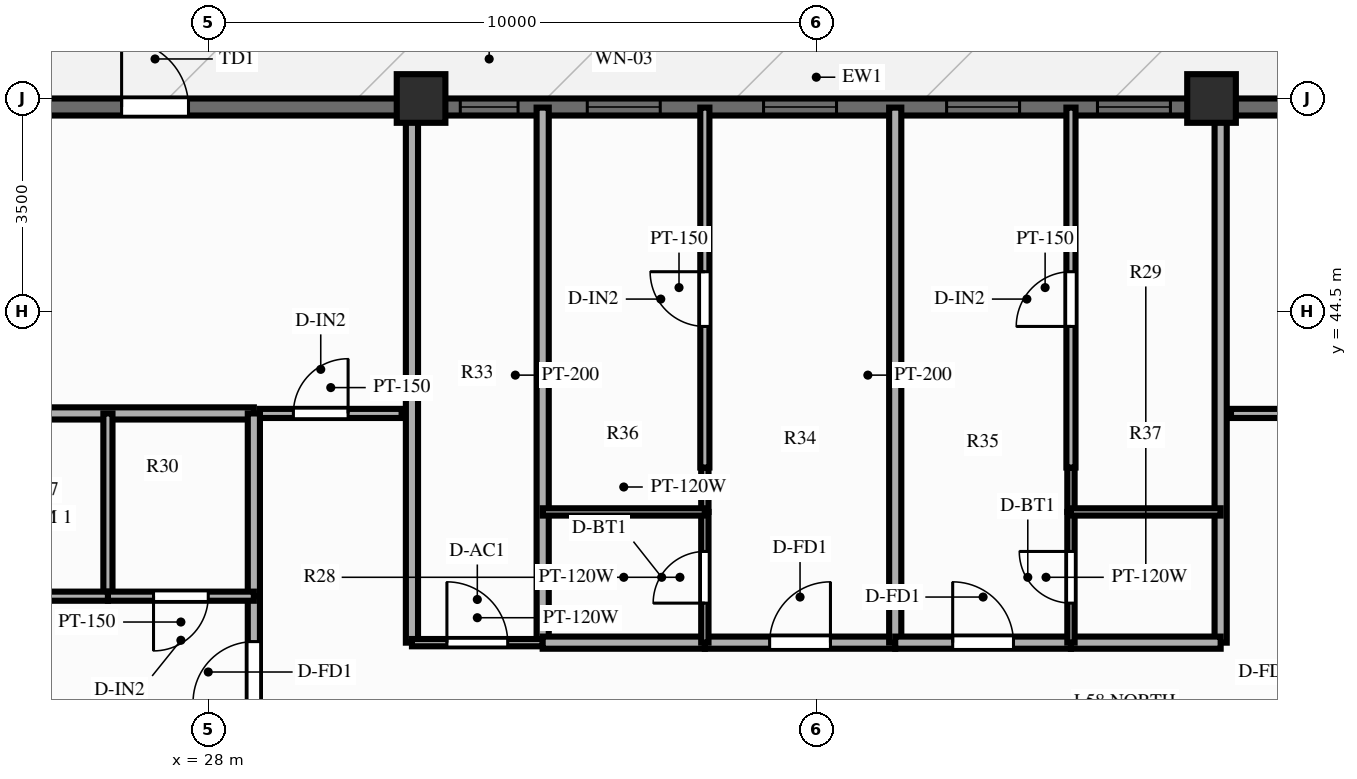
"""IFC4 building model, lengths in metres.
Left out: names, types, materials, properties, quantities, classifications, styles, units other than length and angle.
Written with IfcOpenShell. Run it as: python <this file> out.ifc"""

import sys

from ifc_helpers import new_model, si_unit, direction, frame, frame_2d, origin, origin_2d, place, context, subcontext, project, spatial, rectangle, extrude, source, transform, mapped, element, fill, save


model = new_model("IFC4")
c1 = context("Model", 3, precision=1e-05, world=origin(), true_north=direction((0.0, 1.0)))
c2 = subcontext(c1, "Body", "Model", "MODEL_VIEW")
j1 = project(units=[si_unit("LENGTHUNIT", "METRE"), si_unit("PLANEANGLEUNIT", "RADIAN")], contexts=[c1])
p1 = place(None, origin())
s1 = spatial("IfcSite", under=j1, at=p1, CompositionType="ELEMENT")
p2 = place(p1, origin())
s2 = spatial("IfcBuilding", under=s1, at=p2, CompositionType="ELEMENT")
p3 = place(p2, frame((0.0, 0.0, 186.7)))
s3 = spatial("IfcBuildingStorey", under=s2, at=p3, CompositionType="ELEMENT", Elevation=186.7)
m1 = source(origin(), c2, "Body", "SweptSolid", [
    extrude(rectangle(XDim=0.8, YDim=0.8, at=origin_2d()), origin(), (0.0, 0.0, 1.0), 3.0),
])
for number, where, z_axis, x_axis in (
    (1, (44.5, 48.0, 0.0), (0.0, 0.0, 1.0), (1.0, 0.0, 0.0)),
    (2, (31.5, 48.0, 0.0), (0.0, 0.0, 1.0), (1.0, 0.0, 0.0)),
):
    element("IfcColumn", number, at=place(p3, frame(where, z_axis=z_axis, x_axis=x_axis)), inside=s3, PredefinedType="COLUMN", context=c2, shape_type="MappedRepresentation", body=[
        mapped(m1, transform((0.0, 0.0, 0.0), scale=1.0)),
    ])
p4 = place(p3, frame((22.75, 47.86, 0.0), z_axis=(0.0, 0.0, 1.0), x_axis=(1.0, 0.0, 0.0)))
e3 = element("IfcWall", 3, at=p4, inside=s3, PredefinedType="SOLIDWALL", context=c2, shape_type="SweptSolid", body=[
    extrude(rectangle(XDim=30.5, YDim=0.28, at=frame_2d((15.25, 0.0))), origin(), (0.0, 0.0, 1.0), 2.28),
])
p5 = place(p4, frame((3.825, 0.0, 0.0)))
e4 = element("IfcOpeningElement", 4, at=p5, cuts=e3, PredefinedType="OPENING", context=c2, shape_type="SweptSolid", body=[
    extrude(rectangle(XDim=1.1, YDim=2.15, at=frame_2d((0.55, 1.075))), frame((0.0, 0.152, 0.0), z_axis=(0.0, -1.0, 0.0), x_axis=(1.0, 0.0, 0.0)), (0.0, 0.0, 1.0), 0.304),
])
p6 = place(p4, frame((9.395, 0.0, 0.25)))
e5 = element("IfcOpeningElement", 5, at=p6, cuts=e3, PredefinedType="OPENING", context=c2, shape_type="SweptSolid", body=[
    extrude(rectangle(XDim=0.95, YDim=1.5, at=frame_2d((0.475, 0.75))), frame((0.0, 0.152, 0.0), z_axis=(0.0, -1.0, 0.0), x_axis=(1.0, 0.0, 0.0)), (0.0, 0.0, 1.0), 0.304),
])
p7 = place(p4, frame((11.483, 0.0, 0.25)))
e6 = element("IfcOpeningElement", 6, at=p7, cuts=e3, PredefinedType="OPENING", context=c2, shape_type="SweptSolid", body=[
    extrude(rectangle(XDim=1.2, YDim=1.5, at=frame_2d((0.6, 0.75))), frame((0.0, 0.152, 0.0), z_axis=(0.0, -1.0, 0.0), x_axis=(1.0, 0.0, 0.0)), (0.0, 0.0, 1.0), 0.304),
])
p8 = place(p4, frame((14.383, 0.0, 0.25)))
e7 = element("IfcOpeningElement", 7, at=p8, cuts=e3, PredefinedType="OPENING", context=c2, shape_type="SweptSolid", body=[
    extrude(rectangle(XDim=1.2, YDim=1.5, at=frame_2d((0.6, 0.75))), frame((0.0, 0.152, 0.0), z_axis=(0.0, -1.0, 0.0), x_axis=(1.0, 0.0, 0.0)), (0.0, 0.0, 1.0), 0.304),
])
p9 = place(p4, frame((17.393, 0.0, 0.25)))
e8 = element("IfcOpeningElement", 8, at=p9, cuts=e3, PredefinedType="OPENING", context=c2, shape_type="SweptSolid", body=[
    extrude(rectangle(XDim=1.2, YDim=1.5, at=frame_2d((0.6, 0.75))), frame((0.0, 0.152, 0.0), z_axis=(0.0, -1.0, 0.0), x_axis=(1.0, 0.0, 0.0)), (0.0, 0.0, 1.0), 0.304),
])
p10 = place(p4, frame((19.874, 0.0, 0.25)))
e9 = element("IfcOpeningElement", 9, at=p10, cuts=e3, PredefinedType="OPENING", context=c2, shape_type="SweptSolid", body=[
    extrude(rectangle(XDim=1.2, YDim=1.5, at=frame_2d((0.6, 0.75))), frame((0.0, 0.152, 0.0), z_axis=(0.0, -1.0, 0.0), x_axis=(1.0, 0.0, 0.0)), (0.0, 0.0, 1.0), 0.304),
])
p11 = place(p4, frame((25.525, 0.0, 0.25)))
e10 = element("IfcOpeningElement", 10, at=p11, cuts=e3, PredefinedType="OPENING", context=c2, shape_type="SweptSolid", body=[
    extrude(rectangle(XDim=1.2, YDim=1.5, at=frame_2d((0.6, 0.75))), frame((0.0, 0.152, 0.0), z_axis=(0.0, -1.0, 0.0), x_axis=(1.0, 0.0, 0.0)), (0.0, 0.0, 1.0), 0.304),
])
p12 = place(p3, frame((28.85, 42.82, 0.0), z_axis=(0.0, 0.0, 1.0), x_axis=(1.0, 0.0, 0.0)))
e11 = element("IfcWall", 11, at=p12, inside=s3, PredefinedType="PARTITIONING", context=c2, shape_type="SweptSolid", body=[
    extrude(rectangle(XDim=2.33, YDim=0.15, at=frame_2d((1.165, 0.0))), origin(), (0.0, 0.0, 1.0), 2.79),
])
p13 = place(p12, frame((0.55, 0.0, 0.0)))
e12 = element("IfcOpeningElement", 12, at=p13, cuts=e11, PredefinedType="OPENING", context=c2, shape_type="SweptSolid", body=[
    extrude(rectangle(XDim=0.9, YDim=2.1, at=frame_2d((0.45, 1.05))), frame((0.0, 0.087, 0.0), z_axis=(0.0, -1.0, 0.0), x_axis=(1.0, 0.0, 0.0)), (0.0, 0.0, 1.0), 0.174),
])
p14 = place(p3, frame((44.82, 42.82, 0.0), z_axis=(0.0, 0.0, 1.0), x_axis=(1.0, 0.0, 0.0)))
e13 = element("IfcWall", 13, at=p14, inside=s3, PredefinedType="PARTITIONING", context=c2, shape_type="SweptSolid", body=[
    extrude(rectangle(XDim=2.33, YDim=0.15, at=frame_2d((1.165, 0.0))), origin(), (0.0, 0.0, 1.0), 2.79),
])
p15 = place(p14, frame((0.88, 0.0, 0.0)))
e14 = element("IfcOpeningElement", 14, at=p15, cuts=e13, PredefinedType="OPENING", context=c2, shape_type="SweptSolid", body=[
    extrude(rectangle(XDim=0.9, YDim=2.1, at=frame_2d((0.45, 1.05))), frame((0.0, 0.087, 0.0), z_axis=(0.0, -1.0, 0.0), x_axis=(1.0, 0.0, 0.0)), (0.0, 0.0, 1.0), 0.174),
])
for number, where, z_axis, x_axis in (
    (15, (31.35, 39.05, 0.0), (0.0, 0.0, 1.0), (0.0, 1.0, 0.0)),
    (16, (44.65, 39.05, 0.0), (0.0, 0.0, 1.0), (0.0, 1.0, 0.0)),
):
    element("IfcWall", number, at=place(p3, frame(where, z_axis=z_axis, x_axis=x_axis)), inside=s3, PredefinedType="PARTITIONING", context=c2, shape_type="SweptSolid", body=[
        extrude(rectangle(XDim=8.8, YDim=0.2, at=frame_2d((4.4, 0.0))), origin(), (0.0, 0.0, 1.0), 2.39),
    ])
p16 = place(p3, frame((33.5, 39.05, 0.0), z_axis=(0.0, 0.0, 1.0), x_axis=(0.0, 1.0, 0.0)))
e17 = element("IfcWall", 17, at=p16, inside=s3, PredefinedType="PARTITIONING", context=c2, shape_type="SweptSolid", body=[
    extrude(rectangle(XDim=8.8, YDim=0.2, at=frame_2d((4.4, 0.0))), origin(), (0.0, 0.0, 1.0), 2.79),
])
p17 = place(p3, frame((31.35, 39.05, 0.0), z_axis=(0.0, 0.0, 1.0), x_axis=(1.0, 0.0, 0.0)))
e18 = element("IfcWall", 18, at=p17, inside=s3, PredefinedType="PARTITIONING", context=c2, shape_type="SweptSolid", body=[
    extrude(rectangle(XDim=2.15, YDim=0.12, at=frame_2d((1.075, 0.0))), origin(), (0.0, 0.0, 1.0), 2.79),
])
p18 = place(p17, frame((0.575, 0.0, 0.0)))
e19 = element("IfcOpeningElement", 19, at=p18, cuts=e18, PredefinedType="OPENING", context=c2, shape_type="SweptSolid", body=[
    extrude(rectangle(XDim=1.0, YDim=2.1, at=frame_2d((0.5, 1.05))), frame((0.0, 0.072, 0.0), z_axis=(0.0, -1.0, 0.0), x_axis=(1.0, 0.0, 0.0)), (0.0, 0.0, 1.0), 0.144),
])
p19 = place(p3, frame((33.5, 39.05, 0.0), z_axis=(0.0, 0.0, 1.0), x_axis=(1.0, 0.0, 0.0)))
e20 = element("IfcWall", 20, at=p19, inside=s3, PredefinedType="PARTITIONING", context=c2, shape_type="SweptSolid", body=[
    extrude(rectangle(XDim=2.667, YDim=0.2, at=frame_2d((1.333, 0.0))), origin(), (0.0, 0.0, 1.0), 2.79),
])
p20 = place(p3, frame((36.167, 39.05, 0.0), z_axis=(0.0, 0.0, 1.0), x_axis=(1.0, 0.0, 0.0)))
e21 = element("IfcWall", 21, at=p20, inside=s3, PredefinedType="PARTITIONING", context=c2, shape_type="SweptSolid", body=[
    extrude(rectangle(XDim=3.131, YDim=0.2, at=frame_2d((1.565, 0.0))), origin(), (0.0, 0.0, 1.0), 2.79),
])
p21 = place(p20, frame((1.065, 0.0, 0.0)))
e22 = element("IfcOpeningElement", 22, at=p21, cuts=e21, PredefinedType="OPENING", context=c2, shape_type="SweptSolid", body=[
    extrude(rectangle(XDim=1.0, YDim=2.15, at=frame_2d((0.5, 1.075))), frame((0.0, 0.112, 0.0), z_axis=(0.0, -1.0, 0.0), x_axis=(1.0, 0.0, 0.0)), (0.0, 0.0, 1.0), 0.224),
])
p22 = place(p3, frame((36.167, 39.05, 0.0), z_axis=(0.0, 0.0, 1.0), x_axis=(0.0, 1.0, 0.0)))
e23 = element("IfcWall", 23, at=p22, inside=s3, PredefinedType="PARTITIONING", context=c2, shape_type="SweptSolid", body=[
    extrude(rectangle(XDim=2.15, YDim=0.12, at=frame_2d((1.075, 0.0))), origin(), (0.0, 0.0, 1.0), 2.79),
])
p23 = place(p22, frame((0.65, 0.0, 0.0)))
e24 = element("IfcOpeningElement", 24, at=p23, cuts=e23, PredefinedType="OPENING", context=c2, shape_type="SweptSolid", body=[
    extrude(rectangle(XDim=0.85, YDim=2.05, at=frame_2d((0.425, 1.025))), frame((0.0, 0.072, 0.0), z_axis=(0.0, -1.0, 0.0), x_axis=(1.0, 0.0, 0.0)), (0.0, 0.0, 1.0), 0.144),
])
p24 = place(p3, frame((36.167, 41.2, 0.0), z_axis=(0.0, 0.0, 1.0), x_axis=(0.0, 1.0, 0.0)))
e25 = element("IfcWall", 25, at=p24, inside=s3, PredefinedType="PARTITIONING", context=c2, shape_type="SweptSolid", body=[
    extrude(rectangle(XDim=0.73, YDim=0.12, at=frame_2d((0.365, 0.0))), origin(), (0.0, 0.0, 1.0), 2.79),
])
p25 = place(p3, frame((33.5, 41.2, 0.0), z_axis=(0.0, 0.0, 1.0), x_axis=(1.0, 0.0, 0.0)))
e26 = element("IfcWall", 26, at=p25, inside=s3, PredefinedType="PARTITIONING", context=c2, shape_type="SweptSolid", body=[
    extrude(rectangle(XDim=2.667, YDim=0.12, at=frame_2d((1.333, 0.0))), origin(), (0.0, 0.0, 1.0), 2.79),
])
p26 = place(p3, frame((36.167, 41.93, 0.0), z_axis=(0.0, 0.0, 1.0), x_axis=(0.0, 1.0, 0.0)))
e27 = element("IfcWall", 27, at=p26, inside=s3, PredefinedType="PARTITIONING", context=c2, shape_type="SweptSolid", body=[
    extrude(rectangle(XDim=5.92, YDim=0.15, at=frame_2d((2.96, 0.0))), origin(), (0.0, 0.0, 1.0), 2.79),
])
p27 = place(p26, frame((2.321, 0.0, 0.0)))
e28 = element("IfcOpeningElement", 28, at=p27, cuts=e27, PredefinedType="OPENING", context=c2, shape_type="SweptSolid", body=[
    extrude(rectangle(XDim=0.9, YDim=2.1, at=frame_2d((0.45, 1.05))), frame((0.0, 0.087, 0.0), z_axis=(0.0, -1.0, 0.0), x_axis=(1.0, 0.0, 0.0)), (0.0, 0.0, 1.0), 0.174),
])
p28 = place(p3, frame((39.298, 39.05, 0.0), z_axis=(0.0, 0.0, 1.0), x_axis=(0.0, 1.0, 0.0)))
e29 = element("IfcWall", 29, at=p28, inside=s3, PredefinedType="PARTITIONING", context=c2, shape_type="SweptSolid", body=[
    extrude(rectangle(XDim=8.8, YDim=0.2, at=frame_2d((4.4, 0.0))), origin(), (0.0, 0.0, 1.0), 2.79),
])
p29 = place(p3, frame((39.298, 39.05, 0.0), z_axis=(0.0, 0.0, 1.0), x_axis=(1.0, 0.0, 0.0)))
e30 = element("IfcWall", 30, at=p29, inside=s3, PredefinedType="PARTITIONING", context=c2, shape_type="SweptSolid", body=[
    extrude(rectangle(XDim=2.89, YDim=0.2, at=frame_2d((1.445, 0.0))), origin(), (0.0, 0.0, 1.0), 2.79),
])
p30 = place(p29, frame((0.945, 0.0, 0.0)))
e31 = element("IfcOpeningElement", 31, at=p30, cuts=e30, PredefinedType="OPENING", context=c2, shape_type="SweptSolid", body=[
    extrude(rectangle(XDim=1.0, YDim=2.15, at=frame_2d((0.5, 1.075))), frame((0.0, 0.112, 0.0), z_axis=(0.0, -1.0, 0.0), x_axis=(1.0, 0.0, 0.0)), (0.0, 0.0, 1.0), 0.224),
])
p31 = place(p3, frame((42.188, 39.05, 0.0), z_axis=(0.0, 0.0, 1.0), x_axis=(1.0, 0.0, 0.0)))
e32 = element("IfcWall", 32, at=p31, inside=s3, PredefinedType="PARTITIONING", context=c2, shape_type="SweptSolid", body=[
    extrude(rectangle(XDim=2.462, YDim=0.2, at=frame_2d((1.231, 0.0))), origin(), (0.0, 0.0, 1.0), 2.79),
])
p32 = place(p3, frame((42.188, 39.05, 0.0), z_axis=(0.0, 0.0, 1.0), x_axis=(0.0, 1.0, 0.0)))
e33 = element("IfcWall", 33, at=p32, inside=s3, PredefinedType="PARTITIONING", context=c2, shape_type="SweptSolid", body=[
    extrude(rectangle(XDim=2.15, YDim=0.12, at=frame_2d((1.075, 0.0))), origin(), (0.0, 0.0, 1.0), 2.79),
])
p33 = place(p32, frame((0.65, 0.0, 0.0)))
e34 = element("IfcOpeningElement", 34, at=p33, cuts=e33, PredefinedType="OPENING", context=c2, shape_type="SweptSolid", body=[
    extrude(rectangle(XDim=0.85, YDim=2.05, at=frame_2d((0.425, 1.025))), frame((0.0, 0.072, 0.0), z_axis=(0.0, -1.0, 0.0), x_axis=(1.0, 0.0, 0.0)), (0.0, 0.0, 1.0), 0.144),
])
p34 = place(p3, frame((42.188, 41.2, 0.0), z_axis=(0.0, 0.0, 1.0), x_axis=(0.0, 1.0, 0.0)))
e35 = element("IfcWall", 35, at=p34, inside=s3, PredefinedType="PARTITIONING", context=c2, shape_type="SweptSolid", body=[
    extrude(rectangle(XDim=0.73, YDim=0.12, at=frame_2d((0.365, 0.0))), origin(), (0.0, 0.0, 1.0), 2.79),
])
p35 = place(p3, frame((42.188, 41.2, 0.0), z_axis=(0.0, 0.0, 1.0), x_axis=(1.0, 0.0, 0.0)))
e36 = element("IfcWall", 36, at=p35, inside=s3, PredefinedType="PARTITIONING", context=c2, shape_type="SweptSolid", body=[
    extrude(rectangle(XDim=2.462, YDim=0.12, at=frame_2d((1.231, 0.0))), origin(), (0.0, 0.0, 1.0), 2.79),
])
p36 = place(p3, frame((42.188, 41.93, 0.0), z_axis=(0.0, 0.0, 1.0), x_axis=(0.0, 1.0, 0.0)))
e37 = element("IfcWall", 37, at=p36, inside=s3, PredefinedType="PARTITIONING", context=c2, shape_type="SweptSolid", body=[
    extrude(rectangle(XDim=5.92, YDim=0.15, at=frame_2d((2.96, 0.0))), origin(), (0.0, 0.0, 1.0), 2.79),
])
p37 = place(p36, frame((2.321, 0.0, 0.0)))
e38 = element("IfcOpeningElement", 38, at=p37, cuts=e37, PredefinedType="OPENING", context=c2, shape_type="SweptSolid", body=[
    extrude(rectangle(XDim=0.9, YDim=2.1, at=frame_2d((0.45, 1.05))), frame((0.0, 0.087, 0.0), z_axis=(0.0, -1.0, 0.0), x_axis=(1.0, 0.0, 0.0)), (0.0, 0.0, 1.0), 0.174),
])
p38 = place(p3, frame((28.75, 42.82, 0.0), z_axis=(0.0, 0.0, 1.0), x_axis=(-1.0, 0.0, 0.0)))
e39 = element("IfcWall", 39, at=p38, inside=s3, PredefinedType="PARTITIONING", context=c2, shape_type="SweptSolid", body=[
    extrude(rectangle(XDim=10.85, YDim=0.2, at=frame_2d((5.425, 0.0))), origin(), (0.0, 0.0, 1.0), 2.79),
])
p39 = place(p3, frame((28.75, 37.32, 0.0), z_axis=(0.0, 0.0, 1.0), x_axis=(0.0, 1.0, 0.0)))
e40 = element("IfcWall", 40, at=p39, inside=s3, PredefinedType="PARTITIONING", context=c2, shape_type="SweptSolid", body=[
    extrude(rectangle(XDim=2.494, YDim=0.2, at=frame_2d((1.247, 0.0))), origin(), (0.0, 0.0, 1.0), 2.79),
])
p40 = place(p39, frame((0.747, 0.0, 0.0)))
e41 = element("IfcOpeningElement", 41, at=p40, cuts=e40, PredefinedType="OPENING", context=c2, shape_type="SweptSolid", body=[
    extrude(rectangle(XDim=1.0, YDim=2.15, at=frame_2d((0.5, 1.075))), frame((0.0, 0.112, 0.0), z_axis=(0.0, -1.0, 0.0), x_axis=(1.0, 0.0, 0.0)), (0.0, 0.0, 1.0), 0.224),
])
p41 = place(p3, frame((28.75, 39.814, 0.0), z_axis=(0.0, 0.0, 1.0), x_axis=(0.0, 1.0, 0.0)))
e42 = element("IfcWall", 42, at=p41, inside=s3, PredefinedType="PARTITIONING", context=c2, shape_type="SweptSolid", body=[
    extrude(rectangle(XDim=3.006, YDim=0.2, at=frame_2d((1.503, 0.0))), origin(), (0.0, 0.0, 1.0), 2.79),
])
p42 = place(p3, frame((26.35, 39.814, 0.0), z_axis=(0.0, 0.0, 1.0), x_axis=(0.0, 1.0, 0.0)))
e43 = element("IfcWall", 43, at=p42, inside=s3, PredefinedType="PARTITIONING", context=c2, shape_type="SweptSolid", body=[
    extrude(rectangle(XDim=3.006, YDim=0.15, at=frame_2d((1.503, 0.0))), origin(), (0.0, 0.0, 1.0), 2.79),
])
p43 = place(p3, frame((28.75, 39.814, 0.0), z_axis=(0.0, 0.0, 1.0), x_axis=(-1.0, 0.0, 0.0)))
e44 = element("IfcWall", 44, at=p43, inside=s3, PredefinedType="PARTITIONING", context=c2, shape_type="SweptSolid", body=[
    extrude(rectangle(XDim=2.4, YDim=0.15, at=frame_2d((1.2, 0.0))), origin(), (0.0, 0.0, 1.0), 2.79),
])
p44 = place(p43, frame((0.75, 0.0, 0.0)))
e45 = element("IfcOpeningElement", 45, at=p44, cuts=e44, PredefinedType="OPENING", context=c2, shape_type="SweptSolid", body=[
    extrude(rectangle(XDim=0.9, YDim=2.1, at=frame_2d((0.45, 1.05))), frame((0.0, 0.087, 0.0), z_axis=(0.0, -1.0, 0.0), x_axis=(1.0, 0.0, 0.0)), (0.0, 0.0, 1.0), 0.174),
])
p45 = place(p3, frame((26.35, 39.814, 0.0), z_axis=(0.0, 0.0, 1.0), x_axis=(-1.0, 0.0, 0.0)))
e46 = element("IfcWall", 46, at=p45, inside=s3, PredefinedType="PARTITIONING", context=c2, shape_type="SweptSolid", body=[
    extrude(rectangle(XDim=8.45, YDim=0.15, at=frame_2d((4.225, 0.0))), origin(), (0.0, 0.0, 1.0), 2.79),
])
p46 = place(p45, frame((3.48, 0.0, 0.0)))
e47 = element("IfcOpeningElement", 47, at=p46, cuts=e46, PredefinedType="OPENING", context=c2, shape_type="SweptSolid", body=[
    extrude(rectangle(XDim=0.9, YDim=2.1, at=frame_2d((0.45, 1.05))), frame((0.0, 0.087, 0.0), z_axis=(0.0, -1.0, 0.0), x_axis=(1.0, 0.0, 0.0)), (0.0, 0.0, 1.0), 0.174),
])
m2 = source(origin(), c2, "Body", "SweptSolid", [
    extrude(rectangle(XDim=1.1, YDim=2.15, at=frame_2d((0.55, 1.075))), frame((0.0, 0.025, 0.0), z_axis=(0.0, -1.0, 0.0), x_axis=(1.0, 0.0, 0.0)), (0.0, 0.0, 1.0), 0.05),
])
p47 = place(p5, origin())
e48 = element("IfcDoor", 48, at=p47, inside=s3, OperationType="SINGLE_SWING_LEFT", PredefinedType="DOOR", context=c2, shape_type="MappedRepresentation", body=[
    mapped(m2, transform((0.0, 0.0, 0.0), scale=1.0)),
])
fill(e4, e48)
m3 = source(origin(), c2, "Body", "SweptSolid", [
    extrude(rectangle(XDim=0.95, YDim=1.5, at=frame_2d((0.475, 0.75))), frame((0.0, 0.03, 0.0), z_axis=(0.0, -1.0, 0.0), x_axis=(1.0, 0.0, 0.0)), (0.0, 0.0, 1.0), 0.06),
])
p48 = place(p6, origin())
e49 = element("IfcWindow", 49, at=p48, inside=s3, PartitioningType="SINGLE_PANEL", PredefinedType="WINDOW", context=c2, shape_type="MappedRepresentation", body=[
    mapped(m3, transform((0.0, 0.0, 0.0), scale=1.0)),
])
fill(e5, e49)
m4 = source(origin(), c2, "Body", "SweptSolid", [
    extrude(rectangle(XDim=1.2, YDim=1.5, at=frame_2d((0.6, 0.75))), frame((0.0, 0.03, 0.0), z_axis=(0.0, -1.0, 0.0), x_axis=(1.0, 0.0, 0.0)), (0.0, 0.0, 1.0), 0.06),
])
p49 = place(p7, origin())
e50 = element("IfcWindow", 50, at=p49, inside=s3, PartitioningType="SINGLE_PANEL", PredefinedType="WINDOW", context=c2, shape_type="MappedRepresentation", body=[
    mapped(m4, transform((0.0, 0.0, 0.0), scale=1.0)),
])
fill(e6, e50)
p50 = place(p8, origin())
e51 = element("IfcWindow", 51, at=p50, inside=s3, PartitioningType="SINGLE_PANEL", PredefinedType="WINDOW", context=c2, shape_type="MappedRepresentation", body=[
    mapped(m4, transform((0.0, 0.0, 0.0), scale=1.0)),
])
fill(e7, e51)
p51 = place(p9, origin())
e52 = element("IfcWindow", 52, at=p51, inside=s3, PartitioningType="SINGLE_PANEL", PredefinedType="WINDOW", context=c2, shape_type="MappedRepresentation", body=[
    mapped(m4, transform((0.0, 0.0, 0.0), scale=1.0)),
])
fill(e8, e52)
p52 = place(p10, origin())
e53 = element("IfcWindow", 53, at=p52, inside=s3, PartitioningType="SINGLE_PANEL", PredefinedType="WINDOW", context=c2, shape_type="MappedRepresentation", body=[
    mapped(m4, transform((0.0, 0.0, 0.0), scale=1.0)),
])
fill(e9, e53)
m5 = source(origin(), c2, "Body", "SweptSolid", [
    extrude(rectangle(XDim=0.9, YDim=2.1, at=frame_2d((0.45, 1.05))), frame((0.0, 0.025, 0.0), z_axis=(0.0, -1.0, 0.0), x_axis=(1.0, 0.0, 0.0)), (0.0, 0.0, 1.0), 0.05),
])
p53 = place(p13, origin())
e54 = element("IfcDoor", 54, at=p53, inside=s3, OperationType="SINGLE_SWING_RIGHT", PredefinedType="DOOR", context=c2, shape_type="MappedRepresentation", body=[
    mapped(m5, transform((0.0, 0.0, 0.0), scale=1.0)),
])
fill(e12, e54)
m6 = source(origin(), c2, "Body", "SweptSolid", [
    extrude(rectangle(XDim=1.0, YDim=2.1, at=frame_2d((0.5, 1.05))), frame((0.0, 0.025, 0.0), z_axis=(0.0, -1.0, 0.0), x_axis=(1.0, 0.0, 0.0)), (0.0, 0.0, 1.0), 0.05),
])
p54 = place(p18, origin())
e55 = element("IfcDoor", 55, at=p54, inside=s3, OperationType="SINGLE_SWING_LEFT", PredefinedType="DOOR", context=c2, shape_type="MappedRepresentation", body=[
    mapped(m6, transform((0.0, 0.0, 0.0), scale=1.0)),
])
fill(e19, e55)
m7 = source(origin(), c2, "Body", "SweptSolid", [
    extrude(rectangle(XDim=1.0, YDim=2.15, at=frame_2d((0.5, 1.075))), frame((0.0, 0.025, 0.0), z_axis=(0.0, -1.0, 0.0), x_axis=(1.0, 0.0, 0.0)), (0.0, 0.0, 1.0), 0.05),
])
p55 = place(p21, origin())
e56 = element("IfcDoor", 56, at=p55, inside=s3, OperationType="SINGLE_SWING_RIGHT", PredefinedType="DOOR", context=c2, shape_type="MappedRepresentation", body=[
    mapped(m7, transform((0.0, 0.0, 0.0), scale=1.0)),
])
fill(e22, e56)
m8 = source(origin(), c2, "Body", "SweptSolid", [
    extrude(rectangle(XDim=0.85, YDim=2.05, at=frame_2d((0.425, 1.025))), frame((0.0, 0.025, 0.0), z_axis=(0.0, -1.0, 0.0), x_axis=(1.0, 0.0, 0.0)), (0.0, 0.0, 1.0), 0.05),
])
p56 = place(p23, origin())
e57 = element("IfcDoor", 57, at=p56, inside=s3, OperationType="SINGLE_SWING_LEFT", PredefinedType="DOOR", context=c2, shape_type="MappedRepresentation", body=[
    mapped(m8, transform((0.0, 0.0, 0.0), scale=1.0)),
])
fill(e24, e57)
p57 = place(p27, origin())
e58 = element("IfcDoor", 58, at=p57, inside=s3, OperationType="SINGLE_SWING_RIGHT", PredefinedType="DOOR", context=c2, shape_type="MappedRepresentation", body=[
    mapped(m5, transform((0.0, 0.0, 0.0), scale=1.0)),
])
fill(e28, e58)
p58 = place(p30, origin())
e59 = element("IfcDoor", 59, at=p58, inside=s3, OperationType="SINGLE_SWING_LEFT", PredefinedType="DOOR", context=c2, shape_type="MappedRepresentation", body=[
    mapped(m7, transform((0.0, 0.0, 0.0), scale=1.0)),
])
fill(e31, e59)
p59 = place(p33, origin())
e60 = element("IfcDoor", 60, at=p59, inside=s3, OperationType="SINGLE_SWING_RIGHT", PredefinedType="DOOR", context=c2, shape_type="MappedRepresentation", body=[
    mapped(m8, transform((0.0, 0.0, 0.0), scale=1.0)),
])
fill(e34, e60)
p60 = place(p37, origin())
e61 = element("IfcDoor", 61, at=p60, inside=s3, OperationType="SINGLE_SWING_LEFT", PredefinedType="DOOR", context=c2, shape_type="MappedRepresentation", body=[
    mapped(m5, transform((0.0, 0.0, 0.0), scale=1.0)),
])
fill(e38, e61)
p61 = place(p40, origin())
e62 = element("IfcDoor", 62, at=p61, inside=s3, OperationType="SINGLE_SWING_LEFT", PredefinedType="DOOR", context=c2, shape_type="MappedRepresentation", body=[
    mapped(m7, transform((0.0, 0.0, 0.0), scale=1.0)),
])
fill(e41, e62)
p62 = place(p44, origin())
e63 = element("IfcDoor", 63, at=p62, inside=s3, OperationType="SINGLE_SWING_RIGHT", PredefinedType="DOOR", context=c2, shape_type="MappedRepresentation", body=[
    mapped(m5, transform((0.0, 0.0, 0.0), scale=1.0)),
])
fill(e45, e63)
save(model, sys.argv[1])
